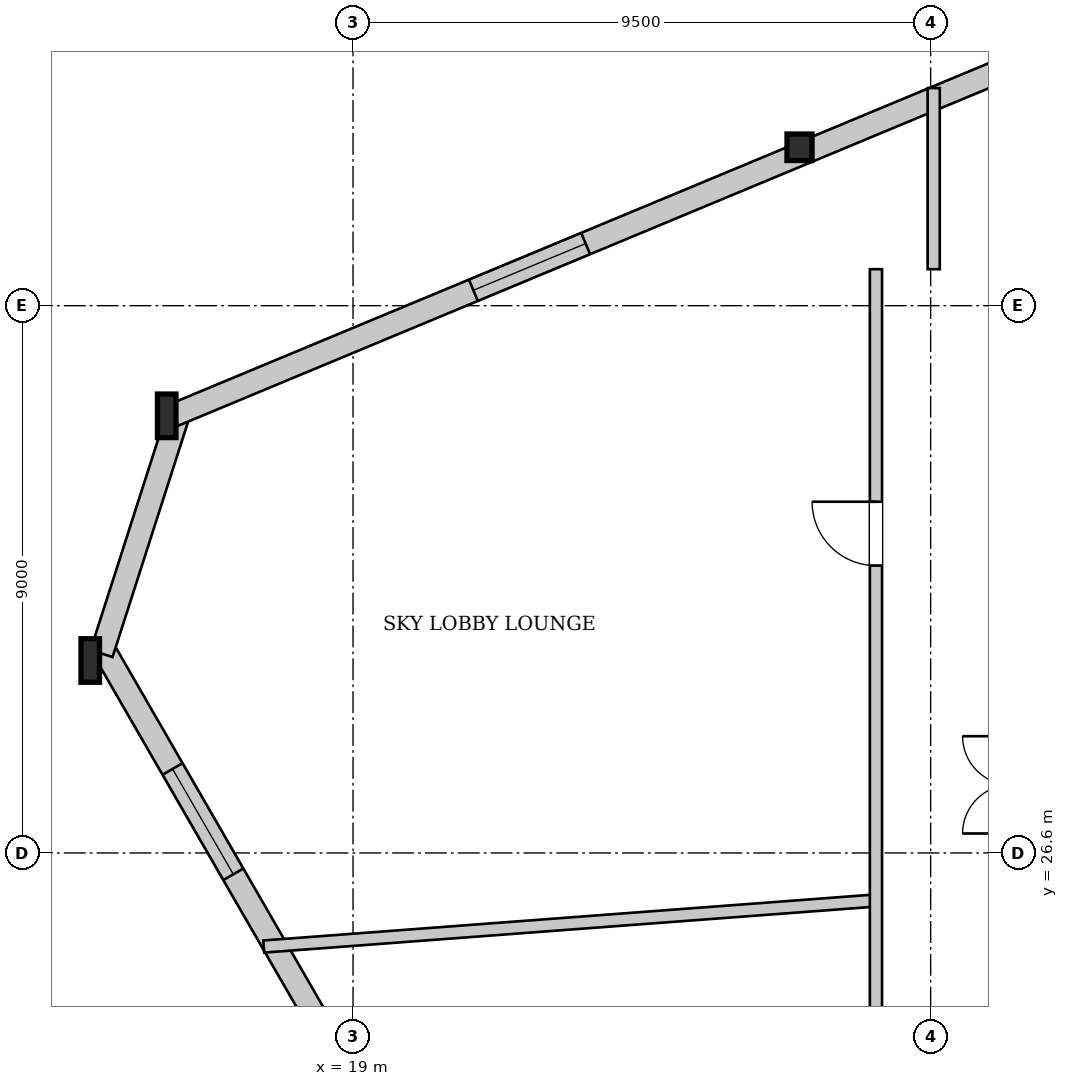
"""IFC4 building model, lengths in metres.
Left out: names, types, materials, properties, quantities, classifications, styles, units other than length and angle.
Written with IfcOpenShell. Run it as: python <this file> out.ifc"""

import sys

from ifc_helpers import new_model, si_unit, direction, frame, frame_2d, origin, origin_2d, place, context, subcontext, project, spatial, rectangle, i_section, extrude, source, transform, mapped, element, fill, save


model = new_model("IFC4")
c1 = context("Model", 3, precision=1e-05, world=origin(), true_north=direction((0.0, 1.0)))
c2 = subcontext(c1, "Body", "Model", "MODEL_VIEW")
j1 = project(units=[si_unit("LENGTHUNIT", "METRE"), si_unit("PLANEANGLEUNIT", "RADIAN")], contexts=[c1])
p1 = place(None, origin())
s1 = spatial("IfcSite", under=j1, at=p1, CompositionType="ELEMENT")
p2 = place(p1, origin())
s2 = spatial("IfcBuilding", under=s1, at=p2, CompositionType="ELEMENT")
p3 = place(p2, frame((0.0, 0.0, 196.3)))
s3 = spatial("IfcBuildingStorey", under=s2, at=p3, CompositionType="ELEMENT", Elevation=196.3)
m1 = source(origin(), c2, "Body", "SweptSolid", [
    extrude(i_section(OverallWidth=0.412, OverallDepth=0.435, WebThickness=0.031, FlangeThickness=0.05, at=origin_2d()), origin(), (0.0, 0.0, 1.0), 3.846),
])
p4 = place(p3, frame((26.424, 38.326, 0.0), z_axis=(-0.04221429404, -0.062591419433, 0.997146061313), x_axis=(0.829063063955, -0.559155109057, 0.0)))
e1 = element("IfcColumn", 1, at=p4, inside=s3, PredefinedType="COLUMN", context=c2, shape_type="MappedRepresentation", body=[
    mapped(m1, transform((0.0, 0.0, 0.0), x_axis=(1.0, 0.0, 0.0), y_axis=(0.0, 1.0, 0.0), z_axis=(0.0, 0.0, 1.0), scale=1.0)),
])
m2 = source(origin(), c2, "Body", "SweptSolid", [
    extrude(i_section(OverallWidth=0.304, OverallDepth=0.716, WebThickness=0.021, FlangeThickness=0.04, at=origin_2d()), origin(), (0.0, 0.0, 1.0), 3.854),
])
p5 = place(p3, frame((15.98, 33.977, 0.0), z_axis=(-0.023055778163, -0.097733696994, 0.994945503817), x_axis=(0.973284646611, -0.229601822013, 0.0)))
e2 = element("IfcColumn", 2, at=p5, inside=s3, PredefinedType="COLUMN", context=c2, shape_type="MappedRepresentation", body=[
    mapped(m2, transform((0.0, 0.0, 0.0), x_axis=(1.0, 0.0, 0.0), y_axis=(0.0, 1.0, 0.0), z_axis=(0.0, 0.0, 1.0), scale=1.0)),
])
m3 = source(origin(), c2, "Body", "SweptSolid", [
    extrude(i_section(OverallWidth=0.304, OverallDepth=0.716, WebThickness=0.021, FlangeThickness=0.04, at=origin_2d()), origin(), (0.0, 0.0, 1.0), 3.851),
])
p6 = place(p3, frame((14.683, 29.938, 0.0), z_axis=(-0.002599570404, -0.089843689343, 0.995952485673), x_axis=(0.999581663817, -0.028922264091, 0.0)))
e3 = element("IfcColumn", 3, at=p6, inside=s3, PredefinedType="COLUMN", context=c2, shape_type="MappedRepresentation", body=[
    mapped(m3, transform((0.0, 0.0, 0.0), x_axis=(1.0, 0.0, 0.0), y_axis=(0.0, 1.0, 0.0), z_axis=(0.0, 0.0, 1.0), scale=1.0)),
])
p7 = place(p3, frame((23.718, 14.662, 0.0), z_axis=(0.0, 0.0, 1.0), x_axis=(-0.499820505407, 0.866129010237, 0.0)))
e4 = element("IfcWall", 4, at=p7, inside=s3, PredefinedType="SOLIDWALL", context=c2, shape_type="SweptSolid", body=[
    extrude(rectangle(XDim=17.747, YDim=0.38, at=frame_2d((8.873, 0.0))), origin(), (0.0, 0.0, 1.0), 3.172),
])
p8 = place(p7, frame((3.969, 0.0, 0.252)))
e5 = element("IfcOpeningElement", 5, at=p8, cuts=e4, PredefinedType="OPENING", context=c2, shape_type="SweptSolid", body=[
    extrude(rectangle(XDim=2.0, YDim=2.8, at=frame_2d((1.0, 1.4))), frame((0.0, 0.2, 0.0), z_axis=(0.0, -1.0, 0.0), x_axis=(1.0, 0.0, 0.0)), (0.0, 0.0, 1.0), 0.4),
])
p9 = place(p7, frame((13.378, 0.0, 0.252)))
e6 = element("IfcOpeningElement", 6, at=p9, cuts=e4, PredefinedType="OPENING", context=c2, shape_type="SweptSolid", body=[
    extrude(rectangle(XDim=2.0, YDim=2.8, at=frame_2d((1.0, 1.4))), frame((0.0, 0.2, 0.0), z_axis=(0.0, -1.0, 0.0), x_axis=(1.0, 0.0, 0.0)), (0.0, 0.0, 1.0), 0.4),
])
p10 = place(p3, frame((14.864, 29.88, 0.0), z_axis=(0.0, 0.0, 1.0), x_axis=(0.305642175368, 0.952146449154, 0.0)))
e7 = element("IfcWall", 7, at=p10, inside=s3, PredefinedType="SOLIDWALL", context=c2, shape_type="SweptSolid", body=[
    extrude(rectangle(XDim=4.242, YDim=0.38, at=frame_2d((2.121, 0.0))), origin(), (0.0, 0.0, 1.0), 3.172),
])
p11 = place(p3, frame((16.053, 33.802, 0.0), z_axis=(0.0, 0.0, 1.0), x_axis=(0.923180319116, 0.384367140111, 0.0)))
e8 = element("IfcWall", 8, at=p11, inside=s3, PredefinedType="SOLIDWALL", context=c2, shape_type="SweptSolid", body=[
    extrude(rectangle(XDim=22.627, YDim=0.38, at=frame_2d((11.313, 0.0))), origin(), (0.0, 0.0, 1.0), 3.172),
])
p12 = place(p11, frame((5.336, 0.0, 0.252)))
e9 = element("IfcOpeningElement", 9, at=p12, cuts=e8, PredefinedType="OPENING", context=c2, shape_type="SweptSolid", body=[
    extrude(rectangle(XDim=2.0, YDim=2.8, at=frame_2d((1.0, 1.4))), frame((0.0, 0.2, 0.0), z_axis=(0.0, -1.0, 0.0), x_axis=(1.0, 0.0, 0.0)), (0.0, 0.0, 1.0), 0.4),
])
p13 = place(p11, frame((15.741, 0.0, 0.252)))
e10 = element("IfcOpeningElement", 10, at=p13, cuts=e8, PredefinedType="OPENING", context=c2, shape_type="SweptSolid", body=[
    extrude(rectangle(XDim=2.0, YDim=2.8, at=frame_2d((1.0, 1.4))), frame((0.0, 0.2, 0.0), z_axis=(0.0, -1.0, 0.0), x_axis=(1.0, 0.0, 0.0)), (0.0, 0.0, 1.0), 0.4),
])
p14 = place(p3, frame((27.6, 25.818, 0.0), z_axis=(0.0, 0.0, 1.0), x_axis=(-0.997184592546, -0.074985921274, 0.0)))
e11 = element("IfcWall", 11, at=p14, inside=s3, PredefinedType="PARTITIONING", context=c2, shape_type="SweptSolid", body=[
    extrude(rectangle(XDim=10.096, YDim=0.2, at=frame_2d((5.048, 0.0))), origin(), (0.0, 0.0, 1.0), 3.78),
])
p15 = place(p3, frame((27.6, 17.0, 0.0), z_axis=(0.0, 0.0, 1.0), x_axis=(0.0, 1.0, 0.0)))
e12 = element("IfcWall", 12, at=p15, inside=s3, PredefinedType="PARTITIONING", context=c2, shape_type="SweptSolid", body=[
    extrude(rectangle(XDim=19.2, YDim=0.2, at=frame_2d((9.6, 0.0))), origin(), (0.0, 0.0, 1.0), 3.78),
])
p16 = place(p15, frame((14.326, 0.0, 0.0)))
e13 = element("IfcOpeningElement", 13, at=p16, cuts=e12, PredefinedType="OPENING", context=c2, shape_type="SweptSolid", body=[
    extrude(rectangle(XDim=1.05, YDim=2.2, at=frame_2d((0.525, 1.1))), frame((0.0, 0.11, 0.0), z_axis=(0.0, -1.0, 0.0), x_axis=(1.0, 0.0, 0.0)), (0.0, 0.0, 1.0), 0.22),
])
p17 = place(p3, frame((28.55, 36.2, 0.0), z_axis=(0.0, 0.0, 1.0), x_axis=(0.0, 1.0, 0.0)))
e14 = element("IfcWall", 14, at=p17, inside=s3, PredefinedType="PARTITIONING", context=c2, shape_type="SweptSolid", body=[
    extrude(rectangle(XDim=2.978, YDim=0.2, at=frame_2d((1.489, 0.0))), origin(), (0.0, 0.0, 1.0), 3.78),
])
m4 = source(origin(), c2, "Body", "SweptSolid", [
    extrude(rectangle(XDim=2.0, YDim=2.8, at=frame_2d((1.0, 1.4))), frame((0.0, 0.03, 0.0), z_axis=(0.0, -1.0, 0.0), x_axis=(1.0, 0.0, 0.0)), (0.0, 0.0, 1.0), 0.06),
])
p18 = place(p9, origin())
e15 = element("IfcWindow", 15, at=p18, inside=s3, PartitioningType="SINGLE_PANEL", PredefinedType="WINDOW", context=c2, shape_type="MappedRepresentation", body=[
    mapped(m4, transform((0.0, 0.0, 0.0), x_axis=(1.0, 0.0, 0.0), y_axis=(0.0, 1.0, 0.0), z_axis=(0.0, 0.0, 1.0), scale=1.0)),
])
fill(e6, e15)
p19 = place(p12, origin())
e16 = element("IfcWindow", 16, at=p19, inside=s3, PartitioningType="SINGLE_PANEL", PredefinedType="WINDOW", context=c2, shape_type="MappedRepresentation", body=[
    mapped(m4, transform((0.0, 0.0, 0.0), x_axis=(1.0, 0.0, 0.0), y_axis=(0.0, 1.0, 0.0), z_axis=(0.0, 0.0, 1.0), scale=1.0)),
])
fill(e9, e16)
m5 = source(origin(), c2, "Body", "SweptSolid", [
    extrude(rectangle(XDim=1.05, YDim=2.2, at=frame_2d((0.525, 1.1))), frame((0.0, 0.025, 0.0), z_axis=(0.0, -1.0, 0.0), x_axis=(1.0, 0.0, 0.0)), (0.0, 0.0, 1.0), 0.05),
])
p20 = place(p16, origin())
e17 = element("IfcDoor", 17, at=p20, inside=s3, OperationType="SINGLE_SWING_RIGHT", PredefinedType="DOOR", context=c2, shape_type="MappedRepresentation", body=[
    mapped(m5, transform((0.0, 0.0, 0.0), x_axis=(1.0, 0.0, 0.0), y_axis=(0.0, 1.0, 0.0), z_axis=(0.0, 0.0, 1.0), scale=1.0)),
])
fill(e13, e17)
save(model, sys.argv[1])
